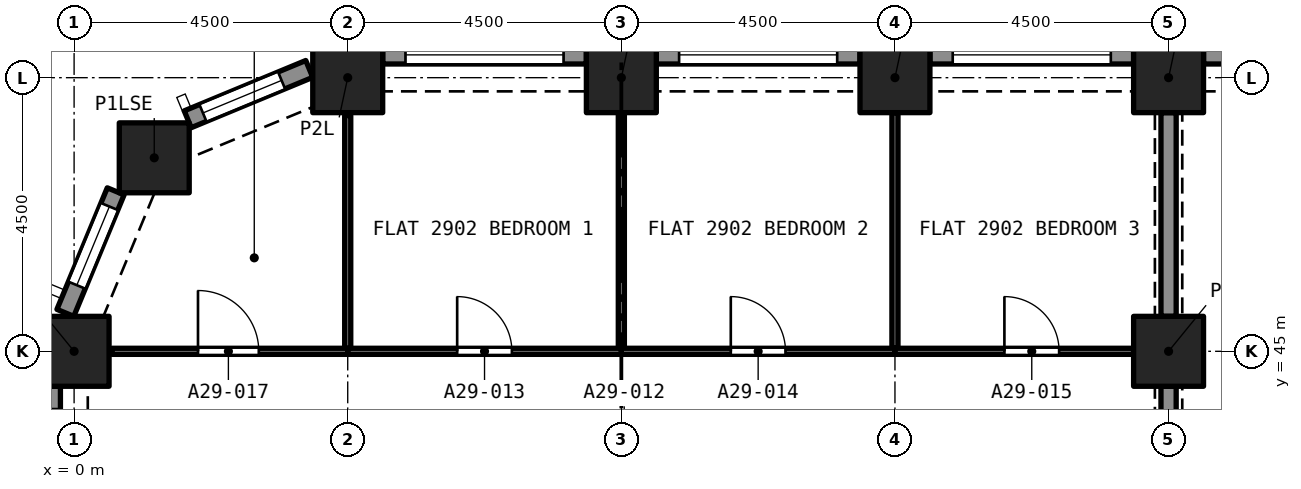
"""IFC4 building model, lengths in metres.
Left out: names, types, materials, properties, quantities, classifications, styles, units other than length and angle.
Written with IfcOpenShell. Run it as: python <this file> out.ifc"""

import sys

from ifc_helpers import new_model, si_unit, direction, frame, frame_2d, origin, origin_2d, place, context, subcontext, project, spatial, rectangle, extrude, element, fill, save


model = new_model("IFC4")
c1 = context("Model", 3, precision=1e-05, world=origin(), true_north=direction((0.0, 1.0)))
c2 = subcontext(c1, "Body", "Model", "MODEL_VIEW")
j1 = project(units=[si_unit("LENGTHUNIT", "METRE"), si_unit("PLANEANGLEUNIT", "RADIAN")], contexts=[c1])
p1 = place(None, origin())
s1 = spatial("IfcSite", under=j1, at=p1, CompositionType="ELEMENT")
p2 = place(p1, origin())
s2 = spatial("IfcBuilding", under=s1, at=p2, CompositionType="ELEMENT")
p3 = place(p2, frame((0.0, 0.0, 105.6)))
s3 = spatial("IfcBuildingStorey", under=s2, at=p3, CompositionType="ELEMENT", Elevation=105.6)
for number, where, z_axis, x_axis in (
    (1, (0.0, 45.0, 0.0), (0.0, 0.0, 1.0), (1.0, 0.0, 0.0)),
    (2, (18.0, 45.0, 0.0), (0.0, 0.0, 1.0), (1.0, 0.0, 0.0)),
    (3, (1.318, 48.182, 0.0), (0.0, 0.0, 1.0), (1.0, 0.0, 0.0)),
    (4, (4.5, 49.5, 0.0), (0.0, 0.0, 1.0), (1.0, 0.0, 0.0)),
    (5, (9.0, 49.5, 0.0), (0.0, 0.0, 1.0), (1.0, 0.0, 0.0)),
    (6, (13.5, 49.5, 0.0), (0.0, 0.0, 1.0), (1.0, 0.0, 0.0)),
    (7, (18.0, 49.5, 0.0), (0.0, 0.0, 1.0), (1.0, 0.0, 0.0)),
):
    element("IfcColumn", number, at=place(p3, frame(where, z_axis=z_axis, x_axis=x_axis)), inside=s3, PredefinedType="COLUMN", context=c2, shape_type="SweptSolid", body=[
        extrude(rectangle(XDim=1.15, YDim=1.15, at=origin_2d()), origin(), (0.0, 0.0, 1.0), 3.2),
    ])
p4 = place(p3, frame((18.575, 49.875, 0.0), z_axis=(0.0, 0.0, 1.0), x_axis=(1.0, 0.0, 0.0)))
e8 = element("IfcWall", 8, at=p4, inside=s3, PredefinedType="SOLIDWALL", context=c2, shape_type="SweptSolid", body=[
    extrude(rectangle(XDim=3.35, YDim=0.3, at=frame_2d((1.675, 0.0))), origin(), (0.0, 0.0, 1.0), 3.2),
])
p5 = place(p4, frame((0.375, 0.0, 0.45)))
e9 = element("IfcOpeningElement", 9, at=p5, cuts=e8, PredefinedType="OPENING", context=c2, shape_type="SweptSolid", body=[
    extrude(rectangle(XDim=2.6, YDim=1.95, at=frame_2d((1.3, 0.975))), frame((0.0, 0.16, 0.0), z_axis=(0.0, -1.0, 0.0), x_axis=(1.0, 0.0, 0.0)), (0.0, 0.0, 1.0), 0.32),
])
p6 = place(p3, frame((14.075, 49.875, 0.0), z_axis=(0.0, 0.0, 1.0), x_axis=(1.0, 0.0, 0.0)))
e10 = element("IfcWall", 10, at=p6, inside=s3, PredefinedType="SOLIDWALL", context=c2, shape_type="SweptSolid", body=[
    extrude(rectangle(XDim=3.35, YDim=0.3, at=frame_2d((1.675, 0.0))), origin(), (0.0, 0.0, 1.0), 3.2),
])
p7 = place(p6, frame((0.375, 0.0, 0.45)))
e11 = element("IfcOpeningElement", 11, at=p7, cuts=e10, PredefinedType="OPENING", context=c2, shape_type="SweptSolid", body=[
    extrude(rectangle(XDim=2.6, YDim=1.95, at=frame_2d((1.3, 0.975))), frame((0.0, 0.16, 0.0), z_axis=(0.0, -1.0, 0.0), x_axis=(1.0, 0.0, 0.0)), (0.0, 0.0, 1.0), 0.32),
])
p8 = place(p3, frame((9.575, 49.875, 0.0), z_axis=(0.0, 0.0, 1.0), x_axis=(1.0, 0.0, 0.0)))
e12 = element("IfcWall", 12, at=p8, inside=s3, PredefinedType="SOLIDWALL", context=c2, shape_type="SweptSolid", body=[
    extrude(rectangle(XDim=3.35, YDim=0.3, at=frame_2d((1.675, 0.0))), origin(), (0.0, 0.0, 1.0), 3.2),
])
p9 = place(p8, frame((0.375, 0.0, 0.45)))
e13 = element("IfcOpeningElement", 13, at=p9, cuts=e12, PredefinedType="OPENING", context=c2, shape_type="SweptSolid", body=[
    extrude(rectangle(XDim=2.6, YDim=1.95, at=frame_2d((1.3, 0.975))), frame((0.0, 0.16, 0.0), z_axis=(0.0, -1.0, 0.0), x_axis=(1.0, 0.0, 0.0)), (0.0, 0.0, 1.0), 0.32),
])
p10 = place(p3, frame((5.075, 49.875, 0.0), z_axis=(0.0, 0.0, 1.0), x_axis=(1.0, 0.0, 0.0)))
e14 = element("IfcWall", 14, at=p10, inside=s3, PredefinedType="SOLIDWALL", context=c2, shape_type="SweptSolid", body=[
    extrude(rectangle(XDim=3.35, YDim=0.3, at=frame_2d((1.675, 0.0))), origin(), (0.0, 0.0, 1.0), 3.2),
])
p11 = place(p10, frame((0.375, 0.0, 0.45)))
e15 = element("IfcOpeningElement", 15, at=p11, cuts=e14, PredefinedType="OPENING", context=c2, shape_type="SweptSolid", body=[
    extrude(rectangle(XDim=2.6, YDim=1.95, at=frame_2d((1.3, 0.975))), frame((0.0, 0.16, 0.0), z_axis=(0.0, -1.0, 0.0), x_axis=(1.0, 0.0, 0.0)), (0.0, 0.0, 1.0), 0.32),
])
p12 = place(p3, frame((1.869, 48.816, 0.0), z_axis=(0.0, 0.0, 1.0), x_axis=(0.923862802911, 0.382723818695, 0.0)))
e16 = element("IfcWall", 16, at=p12, inside=s3, PredefinedType="SOLIDWALL", context=c2, shape_type="SweptSolid", body=[
    extrude(rectangle(XDim=2.164, YDim=0.3, at=frame_2d((1.082, 0.0))), origin(), (0.0, 0.0, 1.0), 3.2),
])
p13 = place(p12, frame((0.271, 0.0, 0.45)))
e17 = element("IfcOpeningElement", 17, at=p13, cuts=e16, PredefinedType="OPENING", context=c2, shape_type="SweptSolid", body=[
    extrude(rectangle(XDim=1.4, YDim=1.95, at=frame_2d((0.7, 0.975))), frame((0.0, 0.16, 0.0), z_axis=(0.0, -1.0, 0.0), x_axis=(1.0, 0.0, 0.0)), (0.0, 0.0, 1.0), 0.32),
])
p14 = place(p3, frame((-0.144, 45.632, 0.0), z_axis=(0.0, 0.0, 1.0), x_axis=(0.382723818695, 0.923862802911, 0.0)))
e18 = element("IfcWall", 18, at=p14, inside=s3, PredefinedType="SOLIDWALL", context=c2, shape_type="SweptSolid", body=[
    extrude(rectangle(XDim=2.164, YDim=0.3, at=frame_2d((1.082, 0.0))), origin(), (0.0, 0.0, 1.0), 3.2),
])
p15 = place(p14, frame((0.493, 0.0, 0.45)))
e19 = element("IfcOpeningElement", 19, at=p15, cuts=e18, PredefinedType="OPENING", context=c2, shape_type="SweptSolid", body=[
    extrude(rectangle(XDim=1.4, YDim=1.95, at=frame_2d((0.7, 0.975))), frame((0.0, 0.16, 0.0), z_axis=(0.0, -1.0, 0.0), x_axis=(1.0, 0.0, 0.0)), (0.0, 0.0, 1.0), 0.32),
])
p16 = place(p3, frame((-0.375, 41.075, 0.0), z_axis=(0.0, 0.0, 1.0), x_axis=(0.0, 1.0, 0.0)))
e20 = element("IfcWall", 20, at=p16, inside=s3, PredefinedType="SOLIDWALL", context=c2, shape_type="SweptSolid", body=[
    extrude(rectangle(XDim=3.35, YDim=0.3, at=frame_2d((1.675, 0.0))), origin(), (0.0, 0.0, 1.0), 3.2),
])
p17 = place(p16, frame((0.375, 0.0, 0.45)))
e21 = element("IfcOpeningElement", 21, at=p17, cuts=e20, PredefinedType="OPENING", context=c2, shape_type="SweptSolid", body=[
    extrude(rectangle(XDim=2.6, YDim=1.95, at=frame_2d((1.3, 0.975))), frame((0.0, 0.16, 0.0), z_axis=(0.0, -1.0, 0.0), x_axis=(1.0, 0.0, 0.0)), (0.0, 0.0, 1.0), 0.32),
])
p18 = place(p3, frame((9.0, 45.05, 0.0), z_axis=(0.0, 0.0, 1.0), x_axis=(0.0, 1.0, 0.0)))
e22 = element("IfcWall", 22, at=p18, inside=s3, PredefinedType="PARTITIONING", context=c2, shape_type="SweptSolid", body=[
    extrude(rectangle(XDim=3.875, YDim=0.1, at=frame_2d((1.938, 0.0))), origin(), (0.0, 0.0, 1.0), 2.9),
])
p19 = place(p3, frame((4.5, 45.0, 0.0), z_axis=(0.0, 0.0, 1.0), x_axis=(1.0, 0.0, 0.0)))
e23 = element("IfcWall", 23, at=p19, inside=s3, PredefinedType="PARTITIONING", context=c2, shape_type="SweptSolid", body=[
    extrude(rectangle(XDim=4.5, YDim=0.1, at=frame_2d((2.25, 0.0))), origin(), (0.0, 0.0, 1.0), 2.9),
])
p20 = place(p19, frame((1.8, 0.0, 0.0)))
e24 = element("IfcOpeningElement", 24, at=p20, cuts=e23, PredefinedType="OPENING", context=c2, shape_type="SweptSolid", body=[
    extrude(rectangle(XDim=0.9, YDim=2.1, at=frame_2d((0.45, 1.05))), frame((0.0, 0.06, 0.0), z_axis=(0.0, -1.0, 0.0), x_axis=(1.0, 0.0, 0.0)), (0.0, 0.0, 1.0), 0.12),
])
p21 = place(p3, frame((4.5, 45.05, 0.0), z_axis=(0.0, 0.0, 1.0), x_axis=(0.0, 1.0, 0.0)))
e25 = element("IfcWall", 25, at=p21, inside=s3, PredefinedType="PARTITIONING", context=c2, shape_type="SweptSolid", body=[
    extrude(rectangle(XDim=3.828, YDim=0.1, at=frame_2d((1.914, 0.0))), origin(), (0.0, 0.0, 1.0), 2.9),
])
p22 = place(p3, frame((13.5, 45.05, 0.0), z_axis=(0.0, 0.0, 1.0), x_axis=(0.0, 1.0, 0.0)))
e26 = element("IfcWall", 26, at=p22, inside=s3, PredefinedType="PARTITIONING", context=c2, shape_type="SweptSolid", body=[
    extrude(rectangle(XDim=3.875, YDim=0.1, at=frame_2d((1.938, 0.0))), origin(), (0.0, 0.0, 1.0), 2.9),
])
p23 = place(p3, frame((9.0, 45.0, 0.0), z_axis=(0.0, 0.0, 1.0), x_axis=(1.0, 0.0, 0.0)))
e27 = element("IfcWall", 27, at=p23, inside=s3, PredefinedType="PARTITIONING", context=c2, shape_type="SweptSolid", body=[
    extrude(rectangle(XDim=4.5, YDim=0.1, at=frame_2d((2.25, 0.0))), origin(), (0.0, 0.0, 1.0), 2.9),
])
p24 = place(p23, frame((1.8, 0.0, 0.0)))
e28 = element("IfcOpeningElement", 28, at=p24, cuts=e27, PredefinedType="OPENING", context=c2, shape_type="SweptSolid", body=[
    extrude(rectangle(XDim=0.9, YDim=2.1, at=frame_2d((0.45, 1.05))), frame((0.0, 0.06, 0.0), z_axis=(0.0, -1.0, 0.0), x_axis=(1.0, 0.0, 0.0)), (0.0, 0.0, 1.0), 0.12),
])
p25 = place(p3, frame((13.5, 45.0, 0.0), z_axis=(0.0, 0.0, 1.0), x_axis=(1.0, 0.0, 0.0)))
e29 = element("IfcWall", 29, at=p25, inside=s3, PredefinedType="PARTITIONING", context=c2, shape_type="SweptSolid", body=[
    extrude(rectangle(XDim=3.925, YDim=0.1, at=frame_2d((1.962, 0.0))), origin(), (0.0, 0.0, 1.0), 2.9),
])
p26 = place(p25, frame((1.8, 0.0, 0.0)))
e30 = element("IfcOpeningElement", 30, at=p26, cuts=e29, PredefinedType="OPENING", context=c2, shape_type="SweptSolid", body=[
    extrude(rectangle(XDim=0.9, YDim=2.1, at=frame_2d((0.45, 1.05))), frame((0.0, 0.06, 0.0), z_axis=(0.0, -1.0, 0.0), x_axis=(1.0, 0.0, 0.0)), (0.0, 0.0, 1.0), 0.12),
])
p27 = place(p3, frame((18.0, 45.575, 0.0), z_axis=(0.0, 0.0, 1.0), x_axis=(0.0, 1.0, 0.0)))
e31 = element("IfcWall", 31, at=p27, inside=s3, PredefinedType="PARTITIONING", context=c2, shape_type="SweptSolid", body=[
    extrude(rectangle(XDim=3.35, YDim=0.25, at=frame_2d((1.675, 0.0))), origin(), (0.0, 0.0, 1.0), 2.38),
])
p28 = place(p3, frame((0.622, 45.0, 0.0), z_axis=(0.0, 0.0, 1.0), x_axis=(1.0, 0.0, 0.0)))
e32 = element("IfcWall", 32, at=p28, inside=s3, PredefinedType="PARTITIONING", context=c2, shape_type="SweptSolid", body=[
    extrude(rectangle(XDim=3.878, YDim=0.1, at=frame_2d((1.939, 0.0))), origin(), (0.0, 0.0, 1.0), 2.9),
])
p29 = place(p28, frame((1.415, 0.0, 0.0)))
e33 = element("IfcOpeningElement", 33, at=p29, cuts=e32, PredefinedType="OPENING", context=c2, shape_type="SweptSolid", body=[
    extrude(rectangle(XDim=1.0, YDim=2.1, at=frame_2d((0.5, 1.05))), frame((0.0, 0.06, 0.0), z_axis=(0.0, -1.0, 0.0), x_axis=(1.0, 0.0, 0.0)), (0.0, 0.0, 1.0), 0.12),
])
p30 = place(p3, frame((18.0, 41.075, 0.0), z_axis=(0.0, 0.0, 1.0), x_axis=(0.0, 1.0, 0.0)))
e34 = element("IfcWall", 34, at=p30, inside=s3, PredefinedType="PARTITIONING", context=c2, shape_type="SweptSolid", body=[
    extrude(rectangle(XDim=3.35, YDim=0.25, at=frame_2d((1.675, 0.0))), origin(), (0.0, 0.0, 1.0), 2.38),
])
p31 = place(p7, origin())
e35 = element("IfcWindow", 35, at=p31, inside=s3, PartitioningType="SINGLE_PANEL", PredefinedType="WINDOW", context=c2, shape_type="SweptSolid", body=[
    extrude(rectangle(XDim=2.6, YDim=1.95, at=frame_2d((1.3, 0.975))), frame((0.0, 0.03, 0.0), z_axis=(0.0, -1.0, 0.0), x_axis=(1.0, 0.0, 0.0)), (0.0, 0.0, 1.0), 0.06),
])
fill(e11, e35)
p32 = place(p9, origin())
e36 = element("IfcWindow", 36, at=p32, inside=s3, PartitioningType="SINGLE_PANEL", PredefinedType="WINDOW", context=c2, shape_type="SweptSolid", body=[
    extrude(rectangle(XDim=2.6, YDim=1.95, at=frame_2d((1.3, 0.975))), frame((0.0, 0.03, 0.0), z_axis=(0.0, -1.0, 0.0), x_axis=(1.0, 0.0, 0.0)), (0.0, 0.0, 1.0), 0.06),
])
fill(e13, e36)
p33 = place(p11, origin())
e37 = element("IfcWindow", 37, at=p33, inside=s3, PartitioningType="SINGLE_PANEL", PredefinedType="WINDOW", context=c2, shape_type="SweptSolid", body=[
    extrude(rectangle(XDim=2.6, YDim=1.95, at=frame_2d((1.3, 0.975))), frame((0.0, 0.03, 0.0), z_axis=(0.0, -1.0, 0.0), x_axis=(1.0, 0.0, 0.0)), (0.0, 0.0, 1.0), 0.06),
])
fill(e15, e37)
p34 = place(p13, origin())
e38 = element("IfcWindow", 38, at=p34, inside=s3, PartitioningType="SINGLE_PANEL", PredefinedType="WINDOW", context=c2, shape_type="SweptSolid", body=[
    extrude(rectangle(XDim=1.4, YDim=1.95, at=frame_2d((0.7, 0.975))), frame((0.0, 0.03, 0.0), z_axis=(0.0, -1.0, 0.0), x_axis=(1.0, 0.0, 0.0)), (0.0, 0.0, 1.0), 0.06),
])
fill(e17, e38)
p35 = place(p15, origin())
e39 = element("IfcWindow", 39, at=p35, inside=s3, PartitioningType="SINGLE_PANEL", PredefinedType="WINDOW", context=c2, shape_type="SweptSolid", body=[
    extrude(rectangle(XDim=1.4, YDim=1.95, at=frame_2d((0.7, 0.975))), frame((0.0, 0.03, 0.0), z_axis=(0.0, -1.0, 0.0), x_axis=(1.0, 0.0, 0.0)), (0.0, 0.0, 1.0), 0.06),
])
fill(e19, e39)
p36 = place(p20, origin())
e40 = element("IfcDoor", 40, at=p36, inside=s3, OperationType="SINGLE_SWING_RIGHT", PredefinedType="DOOR", context=c2, shape_type="SweptSolid", body=[
    extrude(rectangle(XDim=0.9, YDim=2.1, at=frame_2d((0.45, 1.05))), frame((0.0, 0.025, 0.0), z_axis=(0.0, -1.0, 0.0), x_axis=(1.0, 0.0, 0.0)), (0.0, 0.0, 1.0), 0.05),
])
fill(e24, e40)
p37 = place(p24, origin())
e41 = element("IfcDoor", 41, at=p37, inside=s3, OperationType="SINGLE_SWING_LEFT", PredefinedType="DOOR", context=c2, shape_type="SweptSolid", body=[
    extrude(rectangle(XDim=0.9, YDim=2.1, at=frame_2d((0.45, 1.05))), frame((0.0, 0.025, 0.0), z_axis=(0.0, -1.0, 0.0), x_axis=(1.0, 0.0, 0.0)), (0.0, 0.0, 1.0), 0.05),
])
fill(e28, e41)
p38 = place(p26, origin())
e42 = element("IfcDoor", 42, at=p38, inside=s3, OperationType="SINGLE_SWING_RIGHT", PredefinedType="DOOR", context=c2, shape_type="SweptSolid", body=[
    extrude(rectangle(XDim=0.9, YDim=2.1, at=frame_2d((0.45, 1.05))), frame((0.0, 0.025, 0.0), z_axis=(0.0, -1.0, 0.0), x_axis=(1.0, 0.0, 0.0)), (0.0, 0.0, 1.0), 0.05),
])
fill(e30, e42)
p39 = place(p29, origin())
e43 = element("IfcDoor", 43, at=p39, inside=s3, OperationType="SINGLE_SWING_LEFT", PredefinedType="DOOR", context=c2, shape_type="SweptSolid", body=[
    extrude(rectangle(XDim=1.0, YDim=2.1, at=frame_2d((0.5, 1.05))), frame((0.0, 0.025, 0.0), z_axis=(0.0, -1.0, 0.0), x_axis=(1.0, 0.0, 0.0)), (0.0, 0.0, 1.0), 0.05),
])
fill(e33, e43)
save(model, sys.argv[1])
